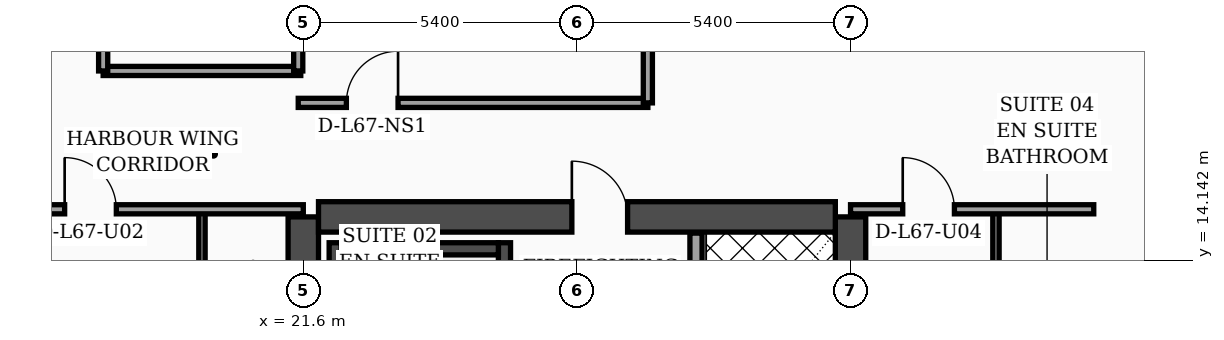
"""IFC4 building model, lengths in metres.
Left out: names, types, materials, properties, quantities, classifications, styles, units other than length and angle.
Written with IfcOpenShell. Run it as: python <this file> out.ifc"""

import sys

from ifc_helpers import new_model, si_unit, direction, frame, frame_2d, origin, place, context, subcontext, project, spatial, rectangle, extrude, element, fill, save


model = new_model("IFC4")
c1 = context("Model", 3, precision=1e-05, world=origin(), true_north=direction((0.0, 1.0)))
c2 = subcontext(c1, "Body", "Model", "MODEL_VIEW")
j1 = project(units=[si_unit("LENGTHUNIT", "METRE"), si_unit("PLANEANGLEUNIT", "RADIAN")], contexts=[c1])
p1 = place(None, origin())
s1 = spatial("IfcSite", under=j1, at=p1, CompositionType="ELEMENT")
p2 = place(p1, origin())
s2 = spatial("IfcBuilding", under=s1, at=p2, CompositionType="ELEMENT")
p3 = place(p2, frame((0.0, 0.0, 271.1)))
s3 = spatial("IfcBuildingStorey", under=s2, at=p3, CompositionType="ELEMENT", Elevation=271.1)
for number, where, z_axis, x_axis in (
    (1, (21.6, 4.6, 0.0), (0.0, 0.0, 1.0), (0.0, 1.0, 0.0)),
    (2, (32.4, 4.6, 0.0), (0.0, 0.0, 1.0), (0.0, 1.0, 0.0)),
):
    element("IfcWall", number, at=place(p3, frame(where, z_axis=z_axis, x_axis=x_axis)), inside=s3, PredefinedType="SHEAR", context=c2, shape_type="SweptSolid", body=[
        extrude(rectangle(XDim=10.4, YDim=0.6, at=frame_2d((5.2, 0.0))), origin(), (0.0, 0.0, 1.0), 3.56),
    ])
p4 = place(p3, frame((21.9, 15.0, 0.0), z_axis=(0.0, 0.0, 1.0), x_axis=(1.0, 0.0, 0.0)))
e3 = element("IfcWall", 3, at=p4, inside=s3, PredefinedType="SHEAR", context=c2, shape_type="SweptSolid", body=[
    extrude(rectangle(XDim=10.2, YDim=0.6, at=frame_2d((5.1, 0.0))), origin(), (0.0, 0.0, 1.0), 3.56),
])
p5 = place(p4, frame((5.0, 0.0, 0.0)))
e4 = element("IfcOpeningElement", 4, at=p5, cuts=e3, PredefinedType="OPENING", context=c2, shape_type="SweptSolid", body=[
    extrude(rectangle(XDim=1.1, YDim=2.2, at=frame_2d((0.55, 1.1))), frame((0.0, 0.31, 0.0), z_axis=(0.0, -1.0, 0.0), x_axis=(1.0, 0.0, 0.0)), (0.0, 0.0, 1.0), 0.62),
])
p6 = place(p3, frame((22.23, 4.9, 0.0), z_axis=(0.0, 0.0, 1.0), x_axis=(0.0, 1.0, 0.0)))
e5 = element("IfcWall", 5, at=p6, inside=s3, PredefinedType="SOLIDWALL", context=c2, shape_type="SweptSolid", body=[
    extrude(rectangle(XDim=9.59, YDim=0.24, at=frame_2d((4.795, 0.0))), origin(), (0.0, 0.0, 1.0), 3.56),
])
p7 = place(p3, frame((25.57, 4.9, 0.0), z_axis=(0.0, 0.0, 1.0), x_axis=(0.0, 1.0, 0.0)))
e6 = element("IfcWall", 6, at=p7, inside=s3, PredefinedType="SOLIDWALL", context=c2, shape_type="SweptSolid", body=[
    extrude(rectangle(XDim=9.59, YDim=0.24, at=frame_2d((4.795, 0.0))), origin(), (0.0, 0.0, 1.0), 3.56),
])
p8 = place(p7, frame((0.35, 0.0, 0.0)))
e7 = element("IfcOpeningElement", 7, at=p8, cuts=e6, PredefinedType="OPENING", context=c2, shape_type="SweptSolid", body=[
    extrude(rectangle(XDim=1.15, YDim=2.2, at=frame_2d((0.575, 1.1))), frame((0.0, 0.13, 0.0), z_axis=(0.0, -1.0, 0.0), x_axis=(1.0, 0.0, 0.0)), (0.0, 0.0, 1.0), 0.26),
])
p9 = place(p3, frame((22.35, 14.37, 0.0), z_axis=(0.0, 0.0, 1.0), x_axis=(1.0, 0.0, 0.0)))
e8 = element("IfcWall", 8, at=p9, inside=s3, PredefinedType="SOLIDWALL", context=c2, shape_type="SweptSolid", body=[
    extrude(rectangle(XDim=3.1, YDim=0.24, at=frame_2d((1.55, 0.0))), origin(), (0.0, 0.0, 1.0), 3.56),
])
p10 = place(p3, frame((43.83, 5.505, 0.0), z_axis=(0.0, 0.0, 1.0), x_axis=(-0.300509063924, 0.953778958931, 0.0)))
e9 = element("IfcWall", 9, at=p10, inside=s3, PredefinedType="SOLIDWALL", context=c2, shape_type="SweptSolid", body=[
    extrude(rectangle(XDim=30.814, YDim=0.32, at=frame_2d((15.407, 0.0))), origin(), (0.0, 0.0, 1.0), 3.56),
])
p11 = place(p10, frame((10.199, 0.0, 0.0)))
e10 = element("IfcOpeningElement", 10, at=p11, cuts=e9, PredefinedType="OPENING", context=c2, shape_type="SweptSolid", body=[
    extrude(rectangle(XDim=1.4, YDim=2.25, at=frame_2d((0.7, 1.125))), frame((0.0, 0.17, 0.0), z_axis=(0.0, -1.0, 0.0), x_axis=(1.0, 0.0, 0.0)), (0.0, 0.0, 1.0), 0.34),
])
p12 = place(p10, frame((4.437, 0.0, 0.7)))
e11 = element("IfcOpeningElement", 11, at=p12, cuts=e9, PredefinedType="OPENING", context=c2, shape_type="SweptSolid", body=[
    extrude(rectangle(XDim=1.6, YDim=1.65, at=frame_2d((0.8, 0.825))), frame((0.0, 0.17, 0.0), z_axis=(0.0, -1.0, 0.0), x_axis=(1.0, 0.0, 0.0)), (0.0, 0.0, 1.0), 0.34),
])
p13 = place(p10, frame((18.696, 0.0, 0.7)))
e12 = element("IfcOpeningElement", 12, at=p13, cuts=e9, PredefinedType="OPENING", context=c2, shape_type="SweptSolid", body=[
    extrude(rectangle(XDim=1.6, YDim=1.65, at=frame_2d((0.8, 0.825))), frame((0.0, 0.17, 0.0), z_axis=(0.0, -1.0, 0.0), x_axis=(1.0, 0.0, 0.0)), (0.0, 0.0, 1.0), 0.34),
])
p14 = place(p10, frame((1.6, 0.0, 0.75)))
e13 = element("IfcOpeningElement", 13, at=p14, cuts=e9, PredefinedType="OPENING", context=c2, shape_type="SweptSolid", body=[
    extrude(rectangle(XDim=1.5, YDim=1.6, at=frame_2d((0.75, 0.8))), frame((0.0, 0.17, 0.0), z_axis=(0.0, -1.0, 0.0), x_axis=(1.0, 0.0, 0.0)), (0.0, 0.0, 1.0), 0.34),
])
p15 = place(p10, frame((7.8, 0.0, 0.75)))
e14 = element("IfcOpeningElement", 14, at=p15, cuts=e9, PredefinedType="OPENING", context=c2, shape_type="SweptSolid", body=[
    extrude(rectangle(XDim=1.5, YDim=1.6, at=frame_2d((0.75, 0.8))), frame((0.0, 0.17, 0.0), z_axis=(0.0, -1.0, 0.0), x_axis=(1.0, 0.0, 0.0)), (0.0, 0.0, 1.0), 0.34),
])
p16 = place(p10, frame((14.0, 0.0, 0.75)))
e15 = element("IfcOpeningElement", 15, at=p16, cuts=e9, PredefinedType="OPENING", context=c2, shape_type="SweptSolid", body=[
    extrude(rectangle(XDim=1.5, YDim=1.6, at=frame_2d((0.75, 0.8))), frame((0.0, 0.17, 0.0), z_axis=(0.0, -1.0, 0.0), x_axis=(1.0, 0.0, 0.0)), (0.0, 0.0, 1.0), 0.34),
])
p17 = place(p10, frame((16.55, 0.0, 0.75)))
e16 = element("IfcOpeningElement", 16, at=p17, cuts=e9, PredefinedType="OPENING", context=c2, shape_type="SweptSolid", body=[
    extrude(rectangle(XDim=1.5, YDim=1.6, at=frame_2d((0.75, 0.8))), frame((0.0, 0.17, 0.0), z_axis=(0.0, -1.0, 0.0), x_axis=(1.0, 0.0, 0.0)), (0.0, 0.0, 1.0), 0.34),
])
p18 = place(p10, frame((20.75, 0.0, 0.75)))
e17 = element("IfcOpeningElement", 17, at=p18, cuts=e9, PredefinedType="OPENING", context=c2, shape_type="SweptSolid", body=[
    extrude(rectangle(XDim=1.5, YDim=1.6, at=frame_2d((0.75, 0.8))), frame((0.0, 0.17, 0.0), z_axis=(0.0, -1.0, 0.0), x_axis=(1.0, 0.0, 0.0)), (0.0, 0.0, 1.0), 0.34),
])
p19 = place(p10, frame((23.3, 0.0, 0.75)))
e18 = element("IfcOpeningElement", 18, at=p19, cuts=e9, PredefinedType="OPENING", context=c2, shape_type="SweptSolid", body=[
    extrude(rectangle(XDim=1.5, YDim=1.6, at=frame_2d((0.75, 0.8))), frame((0.0, 0.17, 0.0), z_axis=(0.0, -1.0, 0.0), x_axis=(1.0, 0.0, 0.0)), (0.0, 0.0, 1.0), 0.34),
])
p20 = place(p10, frame((26.4, 0.0, 0.75)))
e19 = element("IfcOpeningElement", 19, at=p20, cuts=e9, PredefinedType="OPENING", context=c2, shape_type="SweptSolid", body=[
    extrude(rectangle(XDim=1.5, YDim=1.6, at=frame_2d((0.75, 0.8))), frame((0.0, 0.17, 0.0), z_axis=(0.0, -1.0, 0.0), x_axis=(1.0, 0.0, 0.0)), (0.0, 0.0, 1.0), 0.34),
])
p21 = place(p3, frame((29.35, 4.92, 0.0), z_axis=(0.0, 0.0, 1.0), x_axis=(0.0, 1.0, 0.0)))
e20 = element("IfcWall", 20, at=p21, inside=s3, PredefinedType="SOLIDWALL", context=c2, shape_type="SweptSolid", body=[
    extrude(rectangle(XDim=9.76, YDim=0.24, at=frame_2d((4.88, 0.0))), origin(), (0.0, 0.0, 1.0), 3.56),
])
p22 = place(p21, frame((0.55, 0.0, 0.0)))
e21 = element("IfcOpeningElement", 21, at=p22, cuts=e20, PredefinedType="OPENING", context=c2, shape_type="SweptSolid", body=[
    extrude(rectangle(XDim=1.3, YDim=2.35, at=frame_2d((0.65, 1.175))), frame((0.0, 0.13, 0.0), z_axis=(0.0, -1.0, 0.0), x_axis=(1.0, 0.0, 0.0)), (0.0, 0.0, 1.0), 0.26),
])
p23 = place(p3, frame((19.6, 2.44, 0.0), z_axis=(0.0, 0.0, 1.0), x_axis=(0.0, 1.0, 0.0)))
e22 = element("IfcWall", 22, at=p23, inside=s3, PredefinedType="PARTITIONING", context=c2, shape_type="SweptSolid", body=[
    extrude(rectangle(XDim=12.71, YDim=0.125, at=frame_2d((6.355, 0.0))), origin(), (0.0, 0.0, 1.0), 2.59),
])
p24 = place(p23, frame((4.34, 0.0, 0.0)))
e23 = element("IfcOpeningElement", 23, at=p24, cuts=e22, PredefinedType="OPENING", context=c2, shape_type="SweptSolid", body=[
    extrude(rectangle(XDim=0.96, YDim=2.2, at=frame_2d((0.48, 1.1))), frame((0.0, 0.073, 0.0), z_axis=(0.0, -1.0, 0.0), x_axis=(1.0, 0.0, 0.0)), (0.0, 0.0, 1.0), 0.145),
])
p25 = place(p23, frame((10.18, 0.0, 0.0)))
e24 = element("IfcOpeningElement", 24, at=p25, cuts=e22, PredefinedType="OPENING", context=c2, shape_type="SweptSolid", body=[
    extrude(rectangle(XDim=0.9, YDim=2.15, at=frame_2d((0.45, 1.075))), frame((0.0, 0.073, 0.0), z_axis=(0.0, -1.0, 0.0), x_axis=(1.0, 0.0, 0.0)), (0.0, 0.0, 1.0), 0.145),
])
p26 = place(p3, frame((15.15, 15.15, 0.0), z_axis=(0.0, 0.0, 1.0), x_axis=(1.0, 0.0, 0.0)))
e25 = element("IfcWall", 25, at=p26, inside=s3, PredefinedType="PARTITIONING", context=c2, shape_type="SweptSolid", body=[
    extrude(rectangle(XDim=6.45, YDim=0.18, at=frame_2d((3.225, 0.0))), origin(), (0.0, 0.0, 1.0), 2.59),
])
p27 = place(p26, frame((1.74, 0.0, 0.0)))
e26 = element("IfcOpeningElement", 26, at=p27, cuts=e25, PredefinedType="OPENING", context=c2, shape_type="SweptSolid", body=[
    extrude(rectangle(XDim=1.02, YDim=2.2, at=frame_2d((0.51, 1.1))), frame((0.0, 0.1, 0.0), z_axis=(0.0, -1.0, 0.0), x_axis=(1.0, 0.0, 0.0)), (0.0, 0.0, 1.0), 0.2),
])
p28 = place(p3, frame((17.65, 17.88, 0.0), z_axis=(0.0, 0.0, 1.0), x_axis=(1.0, 0.0, 0.0)))
e27 = element("IfcWall", 27, at=p28, inside=s3, PredefinedType="PARTITIONING", context=c2, shape_type="SweptSolid", body=[
    extrude(rectangle(XDim=3.9, YDim=0.18, at=frame_2d((1.95, 0.0))), origin(), (0.0, 0.0, 1.0), 3.09),
])
p29 = place(p3, frame((21.5, 17.88, 0.0), z_axis=(0.0, 0.0, 1.0), x_axis=(0.0, 1.0, 0.0)))
e28 = element("IfcWall", 28, at=p29, inside=s3, PredefinedType="PARTITIONING", context=c2, shape_type="SweptSolid", body=[
    extrude(rectangle(XDim=6.44, YDim=0.18, at=frame_2d((3.22, 0.0))), origin(), (0.0, 0.0, 1.0), 3.09),
])
p30 = place(p3, frame((17.65, 17.88, 0.0), z_axis=(0.0, 0.0, 1.0), x_axis=(0.0, 1.0, 0.0)))
e29 = element("IfcWall", 29, at=p30, inside=s3, PredefinedType="PARTITIONING", context=c2, shape_type="SweptSolid", body=[
    extrude(rectangle(XDim=6.44, YDim=0.18, at=frame_2d((3.22, 0.0))), origin(), (0.0, 0.0, 1.0), 3.09),
])
p31 = place(p30, frame((0.65, 0.0, 0.0)))
e30 = element("IfcOpeningElement", 30, at=p31, cuts=e29, PredefinedType="OPENING", context=c2, shape_type="SweptSolid", body=[
    extrude(rectangle(XDim=0.98, YDim=2.15, at=frame_2d((0.49, 1.075))), frame((0.0, 0.1, 0.0), z_axis=(0.0, -1.0, 0.0), x_axis=(1.0, 0.0, 0.0)), (0.0, 0.0, 1.0), 0.2),
])
p32 = place(p30, frame((3.97, 0.0, 0.0)))
e31 = element("IfcOpeningElement", 31, at=p32, cuts=e29, PredefinedType="OPENING", context=c2, shape_type="SweptSolid", body=[
    extrude(rectangle(XDim=0.96, YDim=2.2, at=frame_2d((0.48, 1.1))), frame((0.0, 0.1, 0.0), z_axis=(0.0, -1.0, 0.0), x_axis=(1.0, 0.0, 0.0)), (0.0, 0.0, 1.0), 0.2),
])
p33 = place(p3, frame((35.27, 2.44, 0.0), z_axis=(0.0, 0.0, 1.0), x_axis=(0.0, 1.0, 0.0)))
e32 = element("IfcWall", 32, at=p33, inside=s3, PredefinedType="PARTITIONING", context=c2, shape_type="SweptSolid", body=[
    extrude(rectangle(XDim=12.71, YDim=0.125, at=frame_2d((6.355, 0.0))), origin(), (0.0, 0.0, 1.0), 2.99),
])
p34 = place(p33, frame((4.35, 0.0, 0.0)))
e33 = element("IfcOpeningElement", 33, at=p34, cuts=e32, PredefinedType="OPENING", context=c2, shape_type="SweptSolid", body=[
    extrude(rectangle(XDim=0.96, YDim=2.2, at=frame_2d((0.48, 1.1))), frame((0.0, 0.073, 0.0), z_axis=(0.0, -1.0, 0.0), x_axis=(1.0, 0.0, 0.0)), (0.0, 0.0, 1.0), 0.145),
])
p35 = place(p33, frame((10.21, 0.0, 0.0)))
e34 = element("IfcOpeningElement", 34, at=p35, cuts=e32, PredefinedType="OPENING", context=c2, shape_type="SweptSolid", body=[
    extrude(rectangle(XDim=0.9, YDim=2.15, at=frame_2d((0.45, 1.075))), frame((0.0, 0.073, 0.0), z_axis=(0.0, -1.0, 0.0), x_axis=(1.0, 0.0, 0.0)), (0.0, 0.0, 1.0), 0.145),
])
p36 = place(p3, frame((32.4, 15.15, 0.0), z_axis=(0.0, 0.0, 1.0), x_axis=(1.0, 0.0, 0.0)))
e35 = element("IfcWall", 35, at=p36, inside=s3, PredefinedType="PARTITIONING", context=c2, shape_type="SweptSolid", body=[
    extrude(rectangle(XDim=4.8, YDim=0.18, at=frame_2d((2.4, 0.0))), origin(), (0.0, 0.0, 1.0), 2.99),
])
p37 = place(p36, frame((1.03, 0.0, 0.0)))
e36 = element("IfcOpeningElement", 36, at=p37, cuts=e35, PredefinedType="OPENING", context=c2, shape_type="SweptSolid", body=[
    extrude(rectangle(XDim=1.02, YDim=2.2, at=frame_2d((0.51, 1.1))), frame((0.0, 0.1, 0.0), z_axis=(0.0, -1.0, 0.0), x_axis=(1.0, 0.0, 0.0)), (0.0, 0.0, 1.0), 0.2),
])
p38 = place(p3, frame((21.5, 17.25, 0.0), z_axis=(0.0, 0.0, 1.0), x_axis=(1.0, 0.0, 0.0)))
e37 = element("IfcWall", 37, at=p38, inside=s3, PredefinedType="PARTITIONING", context=c2, shape_type="SweptSolid", body=[
    extrude(rectangle(XDim=6.9, YDim=0.18, at=frame_2d((3.45, 0.0))), origin(), (0.0, 0.0, 1.0), 3.56),
])
p39 = place(p38, frame((0.95, 0.0, 0.0)))
e38 = element("IfcOpeningElement", 38, at=p39, cuts=e37, PredefinedType="OPENING", context=c2, shape_type="SweptSolid", body=[
    extrude(rectangle(XDim=1.02, YDim=2.2, at=frame_2d((0.51, 1.1))), frame((0.0, 0.1, 0.0), z_axis=(0.0, -1.0, 0.0), x_axis=(1.0, 0.0, 0.0)), (0.0, 0.0, 1.0), 0.2),
])
p40 = place(p3, frame((28.4, 17.25, 0.0), z_axis=(0.0, 0.0, 1.0), x_axis=(0.0, 1.0, 0.0)))
e39 = element("IfcWall", 39, at=p40, inside=s3, PredefinedType="PARTITIONING", context=c2, shape_type="SweptSolid", body=[
    extrude(rectangle(XDim=17.51, YDim=0.18, at=frame_2d((8.755, 0.0))), origin(), (0.0, 0.0, 1.0), 3.09),
])
p41 = place(p27, origin())
e40 = element("IfcDoor", 40, at=p41, inside=s3, OperationType="SINGLE_SWING_LEFT", PredefinedType="DOOR", context=c2, shape_type="SweptSolid", body=[
    extrude(rectangle(XDim=1.02, YDim=2.2, at=frame_2d((0.51, 1.1))), frame((0.0, 0.025, 0.0), z_axis=(0.0, -1.0, 0.0), x_axis=(1.0, 0.0, 0.0)), (0.0, 0.0, 1.0), 0.05),
])
fill(e26, e40)
p42 = place(p37, origin())
e41 = element("IfcDoor", 41, at=p42, inside=s3, OperationType="SINGLE_SWING_LEFT", PredefinedType="DOOR", context=c2, shape_type="SweptSolid", body=[
    extrude(rectangle(XDim=1.02, YDim=2.2, at=frame_2d((0.51, 1.1))), frame((0.0, 0.025, 0.0), z_axis=(0.0, -1.0, 0.0), x_axis=(1.0, 0.0, 0.0)), (0.0, 0.0, 1.0), 0.05),
])
fill(e36, e41)
p43 = place(p39, origin())
e42 = element("IfcDoor", 42, at=p43, inside=s3, OperationType="SINGLE_SWING_RIGHT", PredefinedType="DOOR", context=c2, shape_type="SweptSolid", body=[
    extrude(rectangle(XDim=1.02, YDim=2.2, at=frame_2d((0.51, 1.1))), frame((0.0, 0.025, 0.0), z_axis=(0.0, -1.0, 0.0), x_axis=(1.0, 0.0, 0.0)), (0.0, 0.0, 1.0), 0.05),
])
fill(e38, e42)
p44 = place(p5, origin())
e43 = element("IfcDoor", 43, at=p44, inside=s3, OperationType="SINGLE_SWING_LEFT", PredefinedType="DOOR", context=c2, shape_type="SweptSolid", body=[
    extrude(rectangle(XDim=1.1, YDim=2.2, at=frame_2d((0.55, 1.1))), frame((0.0, 0.025, 0.0), z_axis=(0.0, -1.0, 0.0), x_axis=(1.0, 0.0, 0.0)), (0.0, 0.0, 1.0), 0.05),
])
fill(e4, e43)
save(model, sys.argv[1])
